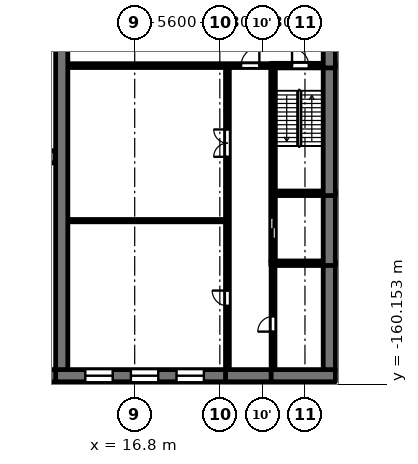
"""IFC4 building model, lengths in metres.
Left out: names, types, materials, properties, quantities, classifications, styles, units other than length and angle.
Written with IfcOpenShell. Run it as: python <this file> out.ifc"""

import sys

from ifc_helpers import new_model, si_unit, direction, frame, frame_2d, origin, place, context, subcontext, project, spatial, rectangle, extrude, element, fill, save


model = new_model("IFC4")
c1 = context("Model", 3, precision=1e-05, world=origin(), true_north=direction((0.0, 1.0)))
c2 = subcontext(c1, "Body", "Model", "MODEL_VIEW")
j1 = project(units=[si_unit("LENGTHUNIT", "METRE"), si_unit("PLANEANGLEUNIT", "RADIAN")], contexts=[c1])
p1 = place(None, origin())
s1 = spatial("IfcSite", under=j1, at=p1, CompositionType="ELEMENT")
p2 = place(p1, origin())
s2 = spatial("IfcBuilding", under=s1, at=p2, CompositionType="ELEMENT")
p3 = place(p2, frame((0.0, 0.0, 16.1)))
s3 = spatial("IfcBuildingStorey", under=s2, at=p3, CompositionType="ELEMENT", Elevation=16.1)
p4 = place(p3, frame((-12.4, -159.6, 0.0), z_axis=(0.0, 0.0, 1.0), x_axis=(1.0, 0.0, 0.0)))
e1 = element("IfcWall", 1, at=p4, inside=s3, PredefinedType="SOLIDWALL", context=c2, shape_type="SweptSolid", body=[
    extrude(rectangle(XDim=24.8, YDim=0.8, at=frame_2d((12.4, 0.0))), origin(), (0.0, 0.0, 1.0), 4.8),
])
p5 = place(p3, frame((11.6, -159.6, 0.0), z_axis=(0.0, 0.0, 1.0), x_axis=(1.0, 0.0, 0.0)))
e2 = element("IfcWall", 2, at=p5, inside=s3, PredefinedType="SOLIDWALL", context=c2, shape_type="SweptSolid", body=[
    extrude(rectangle(XDim=11.425, YDim=0.8, at=frame_2d((5.712, 0.0))), origin(), (0.0, 0.0, 1.0), 4.45),
])
p6 = place(p5, frame((1.95, 0.0, 0.9)))
e3 = element("IfcOpeningElement", 3, at=p6, cuts=e2, PredefinedType="OPENING", context=c2, shape_type="SweptSolid", body=[
    extrude(rectangle(XDim=1.8, YDim=1.5, at=frame_2d((0.9, 0.75))), frame((0.0, 0.41, 0.0), z_axis=(0.0, -1.0, 0.0), x_axis=(1.0, 0.0, 0.0)), (0.0, 0.0, 1.0), 0.82),
])
p7 = place(p5, frame((4.95, 0.0, 0.9)))
e4 = element("IfcOpeningElement", 4, at=p7, cuts=e2, PredefinedType="OPENING", context=c2, shape_type="SweptSolid", body=[
    extrude(rectangle(XDim=1.8, YDim=1.5, at=frame_2d((0.9, 0.75))), frame((0.0, 0.41, 0.0), z_axis=(0.0, -1.0, 0.0), x_axis=(1.0, 0.0, 0.0)), (0.0, 0.0, 1.0), 0.82),
])
p8 = place(p5, frame((7.95, 0.0, 0.9)))
e5 = element("IfcOpeningElement", 5, at=p8, cuts=e2, PredefinedType="OPENING", context=c2, shape_type="SweptSolid", body=[
    extrude(rectangle(XDim=1.8, YDim=1.5, at=frame_2d((0.9, 0.75))), frame((0.0, 0.41, 0.0), z_axis=(0.0, -1.0, 0.0), x_axis=(1.0, 0.0, 0.0)), (0.0, 0.0, 1.0), 0.82),
])
p9 = place(p3, frame((22.775, -159.6, 0.0), z_axis=(0.0, 0.0, 1.0), x_axis=(1.0, 0.0, 0.0)))
e6 = element("IfcWall", 6, at=p9, inside=s3, PredefinedType="SOLIDWALL", context=c2, shape_type="SweptSolid", body=[
    extrude(rectangle(XDim=3.25, YDim=0.8, at=frame_2d((1.625, 0.0))), origin(), (0.0, 0.0, 1.0), 4.45),
])
p10 = place(p3, frame((25.775, -159.6, 0.0), z_axis=(0.0, 0.0, 1.0), x_axis=(1.0, 0.0, 0.0)))
e7 = element("IfcWall", 7, at=p10, inside=s3, PredefinedType="SOLIDWALL", context=c2, shape_type="SweptSolid", body=[
    extrude(rectangle(XDim=4.225, YDim=0.8, at=frame_2d((2.112, 0.0))), origin(), (0.0, 0.0, 1.0), 4.45),
])
p11 = place(p3, frame((25.75, -152.2, 0.0), z_axis=(0.0, 0.0, 1.0), x_axis=(1.0, 0.0, 0.0)))
e8 = element("IfcWall", 8, at=p11, inside=s3, PredefinedType="SOLIDWALL", context=c2, shape_type="SweptSolid", body=[
    extrude(rectangle(XDim=3.45, YDim=0.3, at=frame_2d((1.725, 0.0))), origin(), (0.0, 0.0, 1.0), 4.45),
])
p12 = place(p3, frame((12.4, -149.4, 0.0), z_axis=(0.0, 0.0, 1.0), x_axis=(1.0, 0.0, 0.0)))
e9 = element("IfcWall", 9, at=p12, inside=s3, PredefinedType="PARTITIONING", context=c2, shape_type="SweptSolid", body=[
    extrude(rectangle(XDim=10.375, YDim=0.15, at=frame_2d((5.188, 0.0))), origin(), (0.0, 0.0, 1.0), 4.45),
])
p13 = place(p3, frame((26.05, -147.6, 0.0), z_axis=(0.0, 0.0, 1.0), x_axis=(1.0, 0.0, 0.0)))
e10 = element("IfcWall", 10, at=p13, inside=s3, PredefinedType="SOLIDWALL", context=c2, shape_type="SweptSolid", body=[
    extrude(rectangle(XDim=3.15, YDim=0.3, at=frame_2d((1.575, 0.0))), origin(), (0.0, 0.0, 1.0), 4.45),
])
p14 = place(p3, frame((-11.6, -145.2, 0.0), z_axis=(0.0, 0.0, 1.0), x_axis=(1.0, 0.0, 0.0)))
e11 = element("IfcWall", 11, at=p14, inside=s3, PredefinedType="SOLIDWALL", context=c2, shape_type="SweptSolid", body=[
    extrude(rectangle(XDim=23.2, YDim=0.8, at=frame_2d((11.6, 0.0))), origin(), (0.0, 0.0, 1.0), 4.8),
])
p15 = place(p3, frame((12.4, -139.2, 0.0), z_axis=(0.0, 0.0, 1.0), x_axis=(1.0, 0.0, 0.0)))
e12 = element("IfcWall", 12, at=p15, inside=s3, PredefinedType="SOLIDWALL", context=c2, shape_type="SweptSolid", body=[
    extrude(rectangle(XDim=13.35, YDim=0.25, at=frame_2d((6.675, 0.0))), origin(), (0.0, 0.0, 1.0), 4.45),
])
p16 = place(p15, frame((11.4, 0.0, 0.0)))
e13 = element("IfcOpeningElement", 13, at=p16, cuts=e12, PredefinedType="OPENING", context=c2, shape_type="SweptSolid", body=[
    extrude(rectangle(XDim=1.2, YDim=2.1, at=frame_2d((0.6, 1.05))), frame((0.0, 0.135, 0.0), z_axis=(0.0, -1.0, 0.0), x_axis=(1.0, 0.0, 0.0)), (0.0, 0.0, 1.0), 0.27),
])
p17 = place(p3, frame((25.75, -139.2, 0.0), z_axis=(0.0, 0.0, 1.0), x_axis=(1.0, 0.0, 0.0)))
e14 = element("IfcWall", 14, at=p17, inside=s3, PredefinedType="SOLIDWALL", context=c2, shape_type="SweptSolid", body=[
    extrude(rectangle(XDim=3.45, YDim=0.3, at=frame_2d((1.725, 0.0))), origin(), (0.0, 0.0, 1.0), 4.45),
])
p18 = place(p17, frame((1.4, 0.0, 0.0)))
e15 = element("IfcOpeningElement", 15, at=p18, cuts=e14, PredefinedType="OPENING", context=c2, shape_type="SweptSolid", body=[
    extrude(rectangle(XDim=1.1, YDim=2.1, at=frame_2d((0.55, 1.05))), frame((0.0, 0.16, 0.0), z_axis=(0.0, -1.0, 0.0), x_axis=(1.0, 0.0, 0.0)), (0.0, 0.0, 1.0), 0.32),
])
p19 = place(p3, frame((12.0, -159.2, 0.0), z_axis=(0.0, 0.0, 1.0), x_axis=(0.0, 1.0, 0.0)))
e16 = element("IfcWall", 16, at=p19, inside=s3, PredefinedType="SOLIDWALL", context=c2, shape_type="SweptSolid", body=[
    extrude(rectangle(XDim=34.125, YDim=0.8, at=frame_2d((17.062, 0.0))), origin(), (0.0, 0.0, 1.0), 4.8),
])
p20 = place(p3, frame((22.9, -159.2, 0.0), z_axis=(0.0, 0.0, 1.0), x_axis=(0.0, 1.0, 0.0)))
e17 = element("IfcWall", 17, at=p20, inside=s3, PredefinedType="SOLIDWALL", context=c2, shape_type="SweptSolid", body=[
    extrude(rectangle(XDim=19.875, YDim=0.25, at=frame_2d((9.938, 0.0))), origin(), (0.0, 0.0, 1.0), 4.45),
])
p21 = place(p20, frame((14.0, 0.0, 0.0)))
e18 = element("IfcOpeningElement", 18, at=p21, cuts=e17, PredefinedType="OPENING", context=c2, shape_type="SweptSolid", body=[
    extrude(rectangle(XDim=1.8, YDim=2.1, at=frame_2d((0.9, 1.05))), frame((0.0, 0.135, 0.0), z_axis=(0.0, -1.0, 0.0), x_axis=(1.0, 0.0, 0.0)), (0.0, 0.0, 1.0), 0.27),
])
p22 = place(p20, frame((4.2, 0.0, 0.0)))
e19 = element("IfcOpeningElement", 19, at=p22, cuts=e17, PredefinedType="OPENING", context=c2, shape_type="SweptSolid", body=[
    extrude(rectangle(XDim=1.0, YDim=2.1, at=frame_2d((0.5, 1.05))), frame((0.0, 0.135, 0.0), z_axis=(0.0, -1.0, 0.0), x_axis=(1.0, 0.0, 0.0)), (0.0, 0.0, 1.0), 0.27),
])
p23 = place(p3, frame((25.9, -159.2, 0.0), z_axis=(0.0, 0.0, 1.0), x_axis=(0.0, 1.0, 0.0)))
e20 = element("IfcWall", 20, at=p23, inside=s3, PredefinedType="SOLIDWALL", context=c2, shape_type="SweptSolid", body=[
    extrude(rectangle(XDim=6.85, YDim=0.25, at=frame_2d((3.425, 0.0))), origin(), (0.0, 0.0, 1.0), 4.45),
])
p24 = place(p23, frame((2.5, 0.0, 0.0)))
e21 = element("IfcOpeningElement", 21, at=p24, cuts=e20, PredefinedType="OPENING", context=c2, shape_type="SweptSolid", body=[
    extrude(rectangle(XDim=1.0, YDim=2.1, at=frame_2d((0.5, 1.05))), frame((0.0, 0.135, 0.0), z_axis=(0.0, -1.0, 0.0), x_axis=(1.0, 0.0, 0.0)), (0.0, 0.0, 1.0), 0.27),
])
p25 = place(p3, frame((25.9, -152.05, 0.0), z_axis=(0.0, 0.0, 1.0), x_axis=(0.0, 1.0, 0.0)))
e22 = element("IfcWall", 22, at=p25, inside=s3, PredefinedType="SOLIDWALL", context=c2, shape_type="SweptSolid", body=[
    extrude(rectangle(XDim=12.825, YDim=0.3, at=frame_2d((6.413, 0.0))), origin(), (0.0, 0.0, 1.0), 4.45),
])
p26 = place(p25, frame((1.45, 0.0, 0.0)))
e23 = element("IfcOpeningElement", 23, at=p26, cuts=e22, PredefinedType="OPENING", context=c2, shape_type="SweptSolid", body=[
    extrude(rectangle(XDim=1.4, YDim=2.2, at=frame_2d((0.7, 1.1))), frame((0.0, 0.16, 0.0), z_axis=(0.0, -1.0, 0.0), x_axis=(1.0, 0.0, 0.0)), (0.0, 0.0, 1.0), 0.32),
])
p27 = place(p3, frame((29.6, -152.05, 0.0), z_axis=(0.0, 0.0, 1.0), x_axis=(0.0, -1.0, 0.0)))
e24 = element("IfcWall", 24, at=p27, inside=s3, PredefinedType="SOLIDWALL", context=c2, shape_type="SweptSolid", body=[
    extrude(rectangle(XDim=7.15, YDim=0.8, at=frame_2d((3.575, 0.0))), origin(), (0.0, 0.0, 1.0), 4.45),
])
p28 = place(p3, frame((29.6, -147.45, 0.0), z_axis=(0.0, 0.0, 1.0), x_axis=(0.0, -1.0, 0.0)))
e25 = element("IfcWall", 25, at=p28, inside=s3, PredefinedType="SOLIDWALL", context=c2, shape_type="SweptSolid", body=[
    extrude(rectangle(XDim=4.9, YDim=0.8, at=frame_2d((2.45, 0.0))), origin(), (0.0, 0.0, 1.0), 4.45),
])
p29 = place(p3, frame((29.6, -139.05, 0.0), z_axis=(0.0, 0.0, 1.0), x_axis=(0.0, -1.0, 0.0)))
e26 = element("IfcWall", 26, at=p29, inside=s3, PredefinedType="SOLIDWALL", context=c2, shape_type="SweptSolid", body=[
    extrude(rectangle(XDim=8.7, YDim=0.8, at=frame_2d((4.35, 0.0))), origin(), (0.0, 0.0, 1.0), 4.45),
])
p30 = place(p3, frame((29.6, -131.075, 0.0), z_axis=(0.0, 0.0, 1.0), x_axis=(0.0, -1.0, 0.0)))
e27 = element("IfcWall", 27, at=p30, inside=s3, PredefinedType="SOLIDWALL", context=c2, shape_type="SweptSolid", body=[
    extrude(rectangle(XDim=8.275, YDim=0.8, at=frame_2d((4.137, 0.0))), origin(), (0.0, 0.0, 1.0), 4.45),
])
p31 = place(p30, frame((4.725, 0.0, 0.6)))
e28 = element("IfcOpeningElement", 28, at=p31, cuts=e27, PredefinedType="OPENING", context=c2, shape_type="SweptSolid", body=[
    extrude(rectangle(XDim=2.4, YDim=3.2, at=frame_2d((1.2, 1.6))), frame((0.0, 0.41, 0.0), z_axis=(0.0, -1.0, 0.0), x_axis=(1.0, 0.0, 0.0)), (0.0, 0.0, 1.0), 0.82),
])
p32 = place(p30, frame((1.125, 0.0, 0.6)))
e29 = element("IfcOpeningElement", 29, at=p32, cuts=e27, PredefinedType="OPENING", context=c2, shape_type="SweptSolid", body=[
    extrude(rectangle(XDim=2.4, YDim=3.2, at=frame_2d((1.2, 1.6))), frame((0.0, 0.41, 0.0), z_axis=(0.0, -1.0, 0.0), x_axis=(1.0, 0.0, 0.0)), (0.0, 0.0, 1.0), 0.82),
])
p33 = place(p6, origin())
e30 = element("IfcWindow", 30, at=p33, inside=s3, PartitioningType="SINGLE_PANEL", PredefinedType="WINDOW", context=c2, shape_type="SweptSolid", body=[
    extrude(rectangle(XDim=1.8, YDim=1.5, at=frame_2d((0.9, 0.75))), frame((0.0, 0.03, 0.0), z_axis=(0.0, -1.0, 0.0), x_axis=(1.0, 0.0, 0.0)), (0.0, 0.0, 1.0), 0.06),
])
fill(e3, e30)
p34 = place(p7, origin())
e31 = element("IfcWindow", 31, at=p34, inside=s3, PartitioningType="SINGLE_PANEL", PredefinedType="WINDOW", context=c2, shape_type="SweptSolid", body=[
    extrude(rectangle(XDim=1.8, YDim=1.5, at=frame_2d((0.9, 0.75))), frame((0.0, 0.03, 0.0), z_axis=(0.0, -1.0, 0.0), x_axis=(1.0, 0.0, 0.0)), (0.0, 0.0, 1.0), 0.06),
])
fill(e4, e31)
p35 = place(p8, origin())
e32 = element("IfcWindow", 32, at=p35, inside=s3, PartitioningType="SINGLE_PANEL", PredefinedType="WINDOW", context=c2, shape_type="SweptSolid", body=[
    extrude(rectangle(XDim=1.8, YDim=1.5, at=frame_2d((0.9, 0.75))), frame((0.0, 0.03, 0.0), z_axis=(0.0, -1.0, 0.0), x_axis=(1.0, 0.0, 0.0)), (0.0, 0.0, 1.0), 0.06),
])
fill(e5, e32)
p36 = place(p26, origin())
e33 = element("IfcDoor", 33, at=p36, inside=s3, OperationType="DOUBLE_DOOR_SLIDING", PredefinedType="DOOR", context=c2, shape_type="SweptSolid", body=[
    extrude(rectangle(XDim=1.4, YDim=2.2, at=frame_2d((0.7, 1.1))), frame((0.0, 0.025, 0.0), z_axis=(0.0, -1.0, 0.0), x_axis=(1.0, 0.0, 0.0)), (0.0, 0.0, 1.0), 0.05),
])
fill(e23, e33)
p37 = place(p18, origin())
e34 = element("IfcDoor", 34, at=p37, inside=s3, OperationType="SINGLE_SWING_LEFT", PredefinedType="DOOR", context=c2, shape_type="SweptSolid", body=[
    extrude(rectangle(XDim=1.1, YDim=2.1, at=frame_2d((0.55, 1.05))), frame((0.0, 0.025, 0.0), z_axis=(0.0, -1.0, 0.0), x_axis=(1.0, 0.0, 0.0)), (0.0, 0.0, 1.0), 0.05),
])
fill(e15, e34)
p38 = place(p16, origin())
e35 = element("IfcDoor", 35, at=p38, inside=s3, OperationType="SINGLE_SWING_RIGHT", PredefinedType="DOOR", context=c2, shape_type="SweptSolid", body=[
    extrude(rectangle(XDim=1.2, YDim=2.1, at=frame_2d((0.6, 1.05))), frame((0.0, 0.025, 0.0), z_axis=(0.0, -1.0, 0.0), x_axis=(1.0, 0.0, 0.0)), (0.0, 0.0, 1.0), 0.05),
])
fill(e13, e35)
p39 = place(p21, origin())
e36 = element("IfcDoor", 36, at=p39, inside=s3, OperationType="DOUBLE_DOOR_SINGLE_SWING", PredefinedType="DOOR", context=c2, shape_type="SweptSolid", body=[
    extrude(rectangle(XDim=1.8, YDim=2.1, at=frame_2d((0.9, 1.05))), frame((0.0, 0.025, 0.0), z_axis=(0.0, -1.0, 0.0), x_axis=(1.0, 0.0, 0.0)), (0.0, 0.0, 1.0), 0.05),
])
fill(e18, e36)
p40 = place(p22, origin())
e37 = element("IfcDoor", 37, at=p40, inside=s3, OperationType="SINGLE_SWING_RIGHT", PredefinedType="DOOR", context=c2, shape_type="SweptSolid", body=[
    extrude(rectangle(XDim=1.0, YDim=2.1, at=frame_2d((0.5, 1.05))), frame((0.0, 0.025, 0.0), z_axis=(0.0, -1.0, 0.0), x_axis=(1.0, 0.0, 0.0)), (0.0, 0.0, 1.0), 0.05),
])
fill(e19, e37)
p41 = place(p24, origin())
e38 = element("IfcDoor", 38, at=p41, inside=s3, OperationType="SINGLE_SWING_LEFT", PredefinedType="DOOR", context=c2, shape_type="SweptSolid", body=[
    extrude(rectangle(XDim=1.0, YDim=2.1, at=frame_2d((0.5, 1.05))), frame((0.0, 0.025, 0.0), z_axis=(0.0, -1.0, 0.0), x_axis=(1.0, 0.0, 0.0)), (0.0, 0.0, 1.0), 0.05),
])
fill(e21, e38)
save(model, sys.argv[1])
